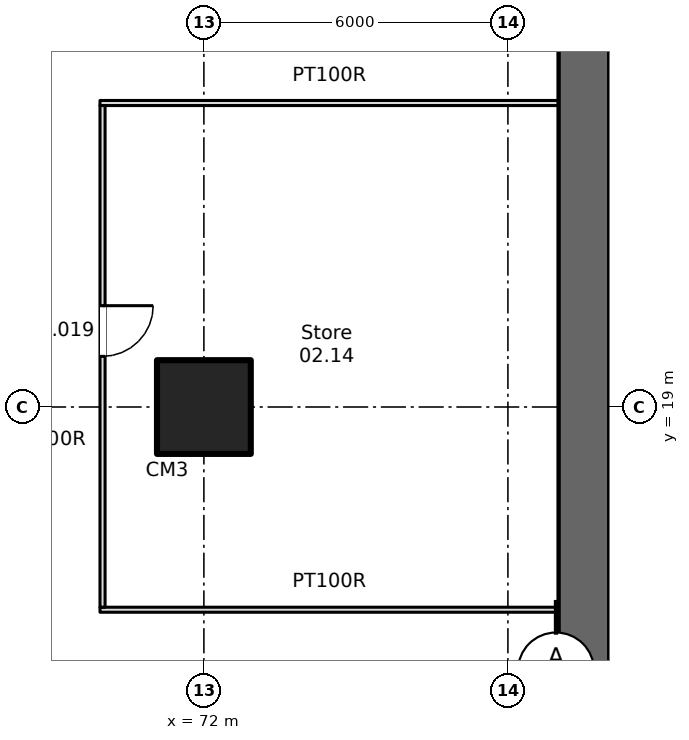
"""IFC4 building model, lengths in metres.
Left out: names, types, materials, properties, quantities, classifications, styles, units other than length and angle.
Written with IfcOpenShell. Run it as: python <this file> out.ifc"""

import sys

from ifc_helpers import new_model, si_unit, direction, frame, frame_2d, origin, origin_2d, place, context, subcontext, project, spatial, rectangle, extrude, element, fill, save


model = new_model("IFC4")
c1 = context("Model", 3, precision=1e-05, world=origin(), true_north=direction((0.0, 1.0)))
c2 = subcontext(c1, "Body", "Model", "MODEL_VIEW")
j1 = project(units=[si_unit("LENGTHUNIT", "METRE"), si_unit("PLANEANGLEUNIT", "RADIAN")], contexts=[c1])
p1 = place(None, origin())
s1 = spatial("IfcSite", under=j1, at=p1, CompositionType="ELEMENT")
p2 = place(p1, origin())
s2 = spatial("IfcBuilding", under=s1, at=p2, CompositionType="ELEMENT")
p3 = place(p2, frame((0.0, 0.0, -6.0)))
s3 = spatial("IfcBuildingStorey", under=s2, at=p3, CompositionType="ELEMENT", Elevation=-6.0)
p4 = place(p3, frame((79.5, -0.5, 0.0), z_axis=(0.0, 0.0, 1.0), x_axis=(0.0, 1.0, 0.0)))
e1 = element("IfcWall", 1, at=p4, inside=s3, PredefinedType="SOLIDWALL", context=c2, shape_type="SweptSolid", body=[
    extrude(rectangle(XDim=46.0, YDim=1.0, at=frame_2d((23.0, 0.0))), origin(), (0.0, 0.0, 1.0), 5.55),
])
p5 = place(p3, frame((72.0, 19.0, 0.0), z_axis=(0.0, 0.0, 1.0), x_axis=(1.0, 0.0, 0.0)))
e2 = element("IfcColumn", 2, at=p5, inside=s3, PredefinedType="COLUMN", context=c2, shape_type="SweptSolid", body=[
    extrude(rectangle(XDim=1.85, YDim=1.85, at=origin_2d()), origin(), (0.0, 0.0, 1.0), 5.55),
])
for number, where, z_axis, x_axis in (
    (3, (69.95, 15.0, 0.0), (0.0, 0.0, 1.0), (1.0, 0.0, 0.0)),
    (4, (69.95, 25.0, 0.0), (0.0, 0.0, 1.0), (1.0, 0.0, 0.0)),
):
    element("IfcWall", number, at=place(p3, frame(where, z_axis=z_axis, x_axis=x_axis)), inside=s3, PredefinedType="PARTITIONING", context=c2, shape_type="SweptSolid", body=[
        extrude(rectangle(XDim=9.05, YDim=0.1, at=frame_2d((4.525, 0.0))), origin(), (0.0, 0.0, 1.0), 5.55),
    ])
p6 = place(p3, frame((70.0, 15.05, 0.0), z_axis=(0.0, 0.0, 1.0), x_axis=(0.0, 1.0, 0.0)))
e5 = element("IfcWall", 5, at=p6, inside=s3, PredefinedType="PARTITIONING", context=c2, shape_type="SweptSolid", body=[
    extrude(rectangle(XDim=9.9, YDim=0.1, at=frame_2d((4.95, 0.0))), origin(), (0.0, 0.0, 1.0), 5.55),
])
p7 = place(p6, frame((4.95, 0.0, 0.0)))
e6 = element("IfcOpeningElement", 6, at=p7, cuts=e5, PredefinedType="OPENING", context=c2, shape_type="SweptSolid", body=[
    extrude(rectangle(XDim=1.0, YDim=2.1, at=frame_2d((0.5, 1.05))), frame((0.0, 0.06, 0.0), z_axis=(0.0, -1.0, 0.0), x_axis=(1.0, 0.0, 0.0)), (0.0, 0.0, 1.0), 0.12),
])
p8 = place(p7, origin())
e7 = element("IfcDoor", 7, at=p8, inside=s3, OperationType="SINGLE_SWING_RIGHT", PredefinedType="DOOR", context=c2, shape_type="SweptSolid", body=[
    extrude(rectangle(XDim=1.0, YDim=2.1, at=frame_2d((0.5, 1.05))), frame((0.0, 0.025, 0.0), z_axis=(0.0, -1.0, 0.0), x_axis=(1.0, 0.0, 0.0)), (0.0, 0.0, 1.0), 0.05),
])
fill(e6, e7)
save(model, sys.argv[1])
